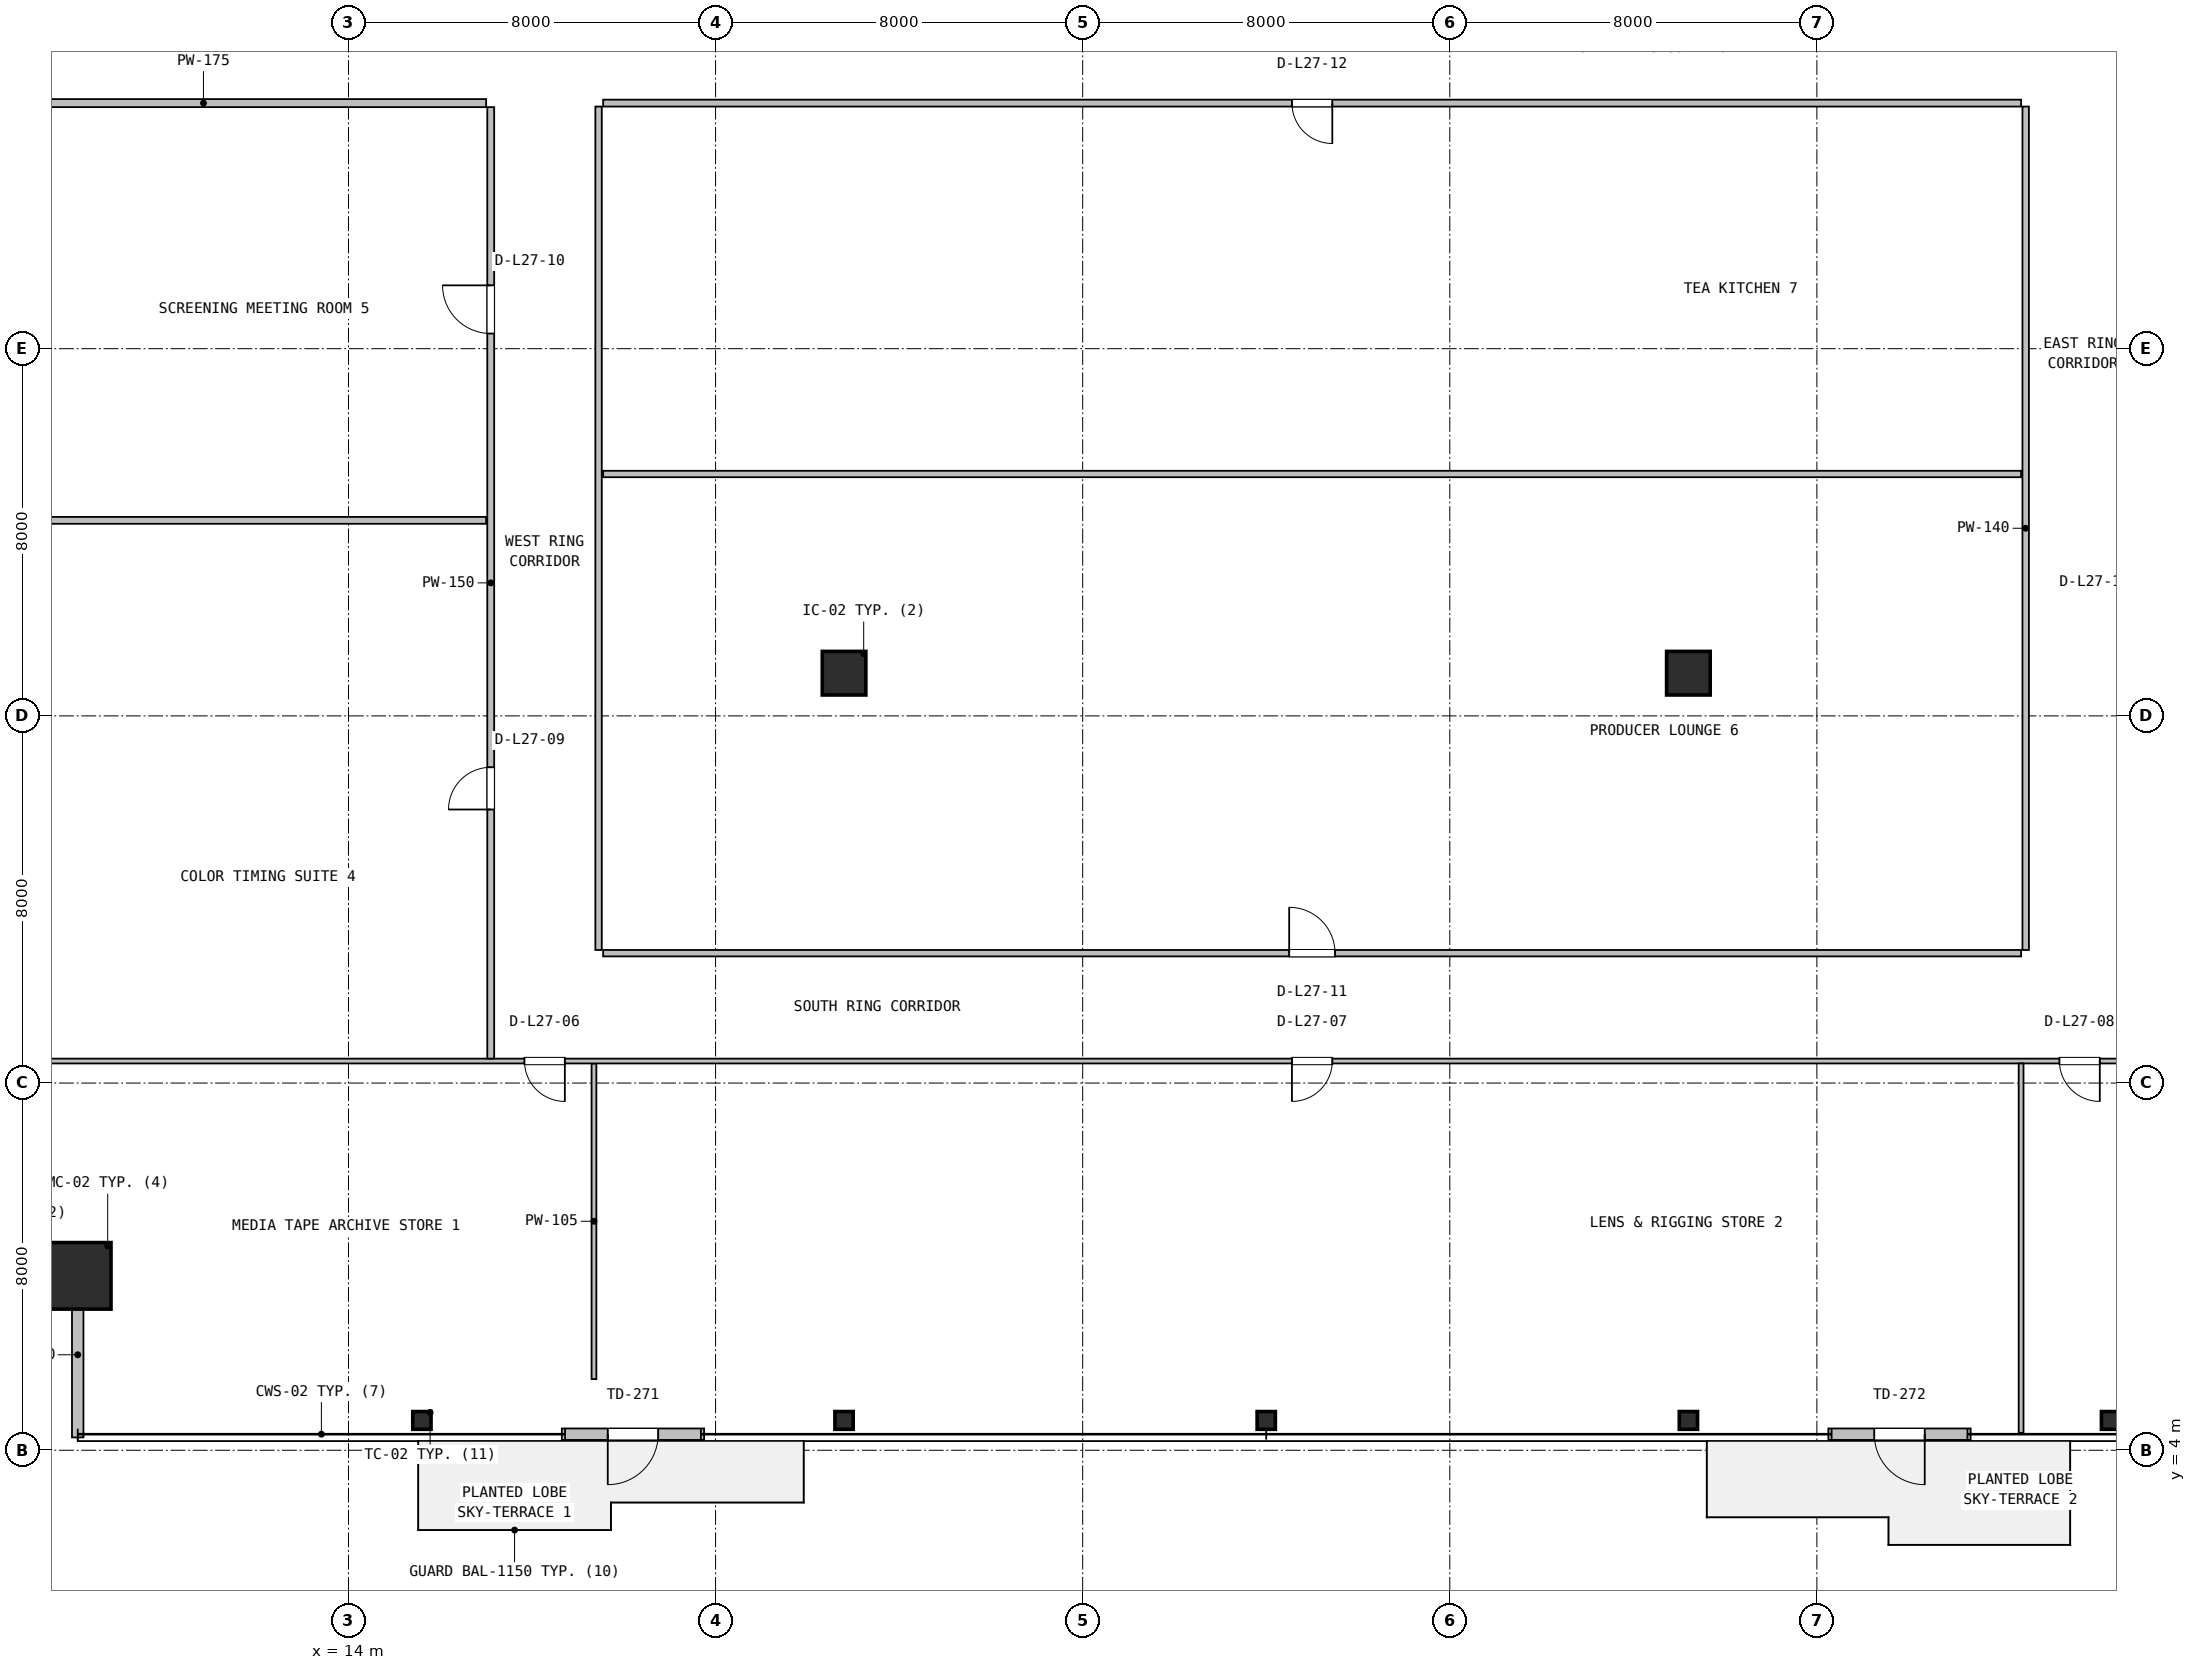
"""IFC4 building model, lengths in metres.
Left out: names, types, materials, properties, quantities, classifications, styles, units other than length and angle.
Written with IfcOpenShell. Run it as: python <this file> out.ifc"""

import sys

from ifc_helpers import new_model, si_unit, direction, frame, frame_2d, origin, origin_2d, place, context, subcontext, project, spatial, rectangle, hollow_rectangle, i_section, extrude, source, transform, mapped, element, fill, save


model = new_model("IFC4")
c1 = context("Model", 3, precision=1e-05, world=origin(), true_north=direction((0.0, 1.0)))
c2 = subcontext(c1, "Body", "Model", "MODEL_VIEW")
j1 = project(units=[si_unit("LENGTHUNIT", "METRE"), si_unit("PLANEANGLEUNIT", "RADIAN")], contexts=[c1])
p1 = place(None, origin())
s1 = spatial("IfcSite", under=j1, at=p1, CompositionType="ELEMENT")
p2 = place(p1, origin())
s2 = spatial("IfcBuilding", under=s1, at=p2, CompositionType="ELEMENT")
p3 = place(p2, frame((0.0, 0.0, 114.4)))
s3 = spatial("IfcBuildingStorey", under=s2, at=p3, CompositionType="ELEMENT", Elevation=114.4)
m1 = source(origin(), c2, "Body", "SweptSolid", [
    extrude(hollow_rectangle(XDim=1.45, YDim=1.45, WallThickness=0.055, at=origin_2d()), origin(), (0.0, 0.0, 1.0), 3.8),
])
p4 = place(p3, frame((8.1, 7.8, 0.0), z_axis=(0.0, 0.0, 1.0), x_axis=(1.0, 0.0, 0.0)))
e1 = element("IfcColumn", 1, at=p4, inside=s3, PredefinedType="COLUMN", context=c2, shape_type="MappedRepresentation", body=[
    mapped(m1, transform((0.0, 0.0, 0.0), x_axis=(1.0, 0.0, 0.0), y_axis=(0.0, 1.0, 0.0), z_axis=(0.0, 0.0, 1.0), scale=1.0)),
])
m2 = source(origin(), c2, "Body", "SweptSolid", [
    extrude(i_section(OverallWidth=0.398, OverallDepth=0.387, WebThickness=0.021, FlangeThickness=0.033, FilletRadius=0.018, at=origin_2d()), origin(), (0.0, 0.0, 1.0), 3.8),
])
for number, where, z_axis, x_axis in (
    (2, (15.6, 4.65, 0.0), (0.0, 0.0, 1.0), (1.0, 0.0, 0.0)),
    (3, (24.8, 4.65, 0.0), (0.0, 0.0, 1.0), (1.0, 0.0, 0.0)),
    (4, (34.0, 4.65, 0.0), (0.0, 0.0, 1.0), (1.0, 0.0, 0.0)),
    (5, (43.2, 4.65, 0.0), (0.0, 0.0, 1.0), (1.0, 0.0, 0.0)),
    (6, (52.4, 4.65, 0.0), (0.0, 0.0, 1.0), (1.0, 0.0, 0.0)),
):
    element("IfcColumn", number, at=place(p3, frame(where, z_axis=z_axis, x_axis=x_axis)), inside=s3, PredefinedType="COLUMN", context=c2, shape_type="MappedRepresentation", body=[
        mapped(m2, transform((0.0, 0.0, 0.0), x_axis=(1.0, 0.0, 0.0), y_axis=(0.0, 1.0, 0.0), z_axis=(0.0, 0.0, 1.0), scale=1.0)),
    ])
m3 = source(origin(), c2, "Body", "SweptSolid", [
    extrude(rectangle(XDim=0.95, YDim=0.95, at=origin_2d()), origin(), (0.0, 0.0, 1.0), 3.8),
])
for number, where, z_axis, x_axis in (
    (7, (24.8, 20.93, 0.0), (0.0, 0.0, 1.0), (1.0, 0.0, 0.0)),
    (8, (43.2, 20.93, 0.0), (0.0, 0.0, 1.0), (1.0, 0.0, 0.0)),
):
    element("IfcColumn", number, at=place(p3, frame(where, z_axis=z_axis, x_axis=x_axis)), inside=s3, PredefinedType="COLUMN", context=c2, shape_type="MappedRepresentation", body=[
        mapped(m3, transform((0.0, 0.0, 0.0), x_axis=(1.0, 0.0, 0.0), y_axis=(0.0, 1.0, 0.0), z_axis=(0.0, 0.0, 1.0), scale=1.0)),
    ])
p5 = place(p3, frame((18.65, 4.35, 0.0), z_axis=(0.0, 0.0, 1.0), x_axis=(1.0, 0.0, 0.0)))
e9 = element("IfcWall", 9, at=p5, inside=s3, PredefinedType="SOLIDWALL", context=c2, shape_type="SweptSolid", body=[
    extrude(rectangle(XDim=3.1, YDim=0.25, at=frame_2d((1.55, 0.0))), origin(), (0.0, 0.0, 1.0), 3.53),
])
p6 = place(p5, frame((1.0, 0.0, 0.0)))
e10 = element("IfcOpeningElement", 10, at=p6, cuts=e9, PredefinedType="OPENING", context=c2, shape_type="SweptSolid", body=[
    extrude(rectangle(XDim=1.1, YDim=2.15, at=frame_2d((0.55, 1.075))), frame((0.0, 0.135, 0.0), z_axis=(0.0, -1.0, 0.0), x_axis=(1.0, 0.0, 0.0)), (0.0, 0.0, 1.0), 0.27),
])
p7 = place(p3, frame((46.25, 4.35, 0.0), z_axis=(0.0, 0.0, 1.0), x_axis=(1.0, 0.0, 0.0)))
e11 = element("IfcWall", 11, at=p7, inside=s3, PredefinedType="SOLIDWALL", context=c2, shape_type="SweptSolid", body=[
    extrude(rectangle(XDim=3.1, YDim=0.25, at=frame_2d((1.55, 0.0))), origin(), (0.0, 0.0, 1.0), 3.53),
])
p8 = place(p7, frame((1.0, 0.0, 0.0)))
e12 = element("IfcOpeningElement", 12, at=p8, cuts=e11, PredefinedType="OPENING", context=c2, shape_type="SweptSolid", body=[
    extrude(rectangle(XDim=1.1, YDim=2.15, at=frame_2d((0.55, 1.075))), frame((0.0, 0.135, 0.0), z_axis=(0.0, -1.0, 0.0), x_axis=(1.0, 0.0, 0.0)), (0.0, 0.0, 1.0), 0.27),
])
p9 = place(p3, frame((8.1, 4.28, 0.0), z_axis=(0.0, 0.0, 1.0), x_axis=(0.0, 1.0, 0.0)))
e13 = element("IfcWall", 13, at=p9, inside=s3, PredefinedType="SOLIDWALL", context=c2, shape_type="SweptSolid", body=[
    extrude(rectangle(XDim=3.6, YDim=0.25, at=frame_2d((1.8, 0.0))), origin(), (0.0, 0.0, 1.0), 3.108),
])
p10 = place(p3, frame((19.35, 5.55, 0.0), z_axis=(0.0, 0.0, 1.0), x_axis=(0.0, 1.0, 0.0)))
e14 = element("IfcWall", 14, at=p10, inside=s3, PredefinedType="PARTITIONING", context=c2, shape_type="SweptSolid", body=[
    extrude(rectangle(XDim=6.878, YDim=0.105, at=frame_2d((3.439, 0.0))), origin(), (0.0, 0.0, 1.0), 3.222),
])
p11 = place(p3, frame((4.68, 12.48, 0.0), z_axis=(0.0, 0.0, 1.0), x_axis=(1.0, 0.0, 0.0)))
e15 = element("IfcWall", 15, at=p11, inside=s3, PredefinedType="PARTITIONING", context=c2, shape_type="SweptSolid", body=[
    extrude(rectangle(XDim=58.64, YDim=0.105, at=frame_2d((29.32, 0.0))), origin(), (0.0, 0.0, 1.0), 2.83),
])
p12 = place(p11, frame((13.155, 0.0, 0.0)))
e16 = element("IfcOpeningElement", 16, at=p12, cuts=e15, PredefinedType="OPENING", context=c2, shape_type="SweptSolid", body=[
    extrude(rectangle(XDim=0.88, YDim=2.06, at=frame_2d((0.44, 1.03))), frame((0.0, 0.062, 0.0), z_axis=(0.0, -1.0, 0.0), x_axis=(1.0, 0.0, 0.0)), (0.0, 0.0, 1.0), 0.125),
])
p13 = place(p11, frame((29.88, 0.0, 0.0)))
e17 = element("IfcOpeningElement", 17, at=p13, cuts=e15, PredefinedType="OPENING", context=c2, shape_type="SweptSolid", body=[
    extrude(rectangle(XDim=0.88, YDim=2.06, at=frame_2d((0.44, 1.03))), frame((0.0, 0.062, 0.0), z_axis=(0.0, -1.0, 0.0), x_axis=(1.0, 0.0, 0.0)), (0.0, 0.0, 1.0), 0.125),
])
p14 = place(p11, frame((46.605, 0.0, 0.0)))
e18 = element("IfcOpeningElement", 18, at=p14, cuts=e15, PredefinedType="OPENING", context=c2, shape_type="SweptSolid", body=[
    extrude(rectangle(XDim=0.88, YDim=2.06, at=frame_2d((0.44, 1.03))), frame((0.0, 0.062, 0.0), z_axis=(0.0, -1.0, 0.0), x_axis=(1.0, 0.0, 0.0)), (0.0, 0.0, 1.0), 0.125),
])
p15 = place(p3, frame((50.45, 4.38, 0.0), z_axis=(0.0, 0.0, 1.0), x_axis=(0.0, 1.0, 0.0)))
e19 = element("IfcWall", 19, at=p15, inside=s3, PredefinedType="PARTITIONING", context=c2, shape_type="SweptSolid", body=[
    extrude(rectangle(XDim=8.048, YDim=0.105, at=frame_2d((4.024, 0.0))), origin(), (0.0, 0.0, 1.0), 3.108),
])
p16 = place(p3, frame((17.1, 12.533, 0.0), z_axis=(0.0, 0.0, 1.0), x_axis=(0.0, 1.0, 0.0)))
e20 = element("IfcWall", 20, at=p16, inside=s3, PredefinedType="PARTITIONING", context=c2, shape_type="SweptSolid", body=[
    extrude(rectangle(XDim=20.73, YDim=0.15, at=frame_2d((10.365, 0.0))), origin(), (0.0, 0.0, 1.0), 3.222),
])
p17 = place(p16, frame((5.427, 0.0, 0.0)))
e21 = element("IfcOpeningElement", 21, at=p17, cuts=e20, PredefinedType="OPENING", context=c2, shape_type="SweptSolid", body=[
    extrude(rectangle(XDim=0.92, YDim=2.08, at=frame_2d((0.46, 1.04))), frame((0.0, 0.085, 0.0), z_axis=(0.0, -1.0, 0.0), x_axis=(1.0, 0.0, 0.0)), (0.0, 0.0, 1.0), 0.17),
])
p18 = place(p16, frame((15.797, 0.0, 0.0)))
e22 = element("IfcOpeningElement", 22, at=p18, cuts=e20, PredefinedType="OPENING", context=c2, shape_type="SweptSolid", body=[
    extrude(rectangle(XDim=1.05, YDim=2.1, at=frame_2d((0.525, 1.05))), frame((0.0, 0.085, 0.0), z_axis=(0.0, -1.0, 0.0), x_axis=(1.0, 0.0, 0.0)), (0.0, 0.0, 1.0), 0.17),
])
p19 = place(p3, frame((4.68, 24.26, 0.0), z_axis=(0.0, 0.0, 1.0), x_axis=(1.0, 0.0, 0.0)))
e23 = element("IfcWall", 23, at=p19, inside=s3, PredefinedType="PARTITIONING", context=c2, shape_type="SweptSolid", body=[
    extrude(rectangle(XDim=12.32, YDim=0.15, at=frame_2d((6.16, 0.0))), origin(), (0.0, 0.0, 1.0), 3.108),
])
p20 = place(p3, frame((4.68, 33.35, 0.0), z_axis=(0.0, 0.0, 1.0), x_axis=(1.0, 0.0, 0.0)))
e24 = element("IfcWall", 24, at=p20, inside=s3, PredefinedType="PARTITIONING", context=c2, shape_type="SweptSolid", body=[
    extrude(rectangle(XDim=12.32, YDim=0.175, at=frame_2d((6.16, 0.0))), origin(), (0.0, 0.0, 1.0), 3.108),
])
p21 = place(p3, frame((19.55, 14.83, 0.0), z_axis=(0.0, 0.0, 1.0), x_axis=(1.0, 0.0, 0.0)))
e25 = element("IfcWall", 25, at=p21, inside=s3, PredefinedType="PARTITIONING", context=c2, shape_type="SweptSolid", body=[
    extrude(rectangle(XDim=30.9, YDim=0.14, at=frame_2d((15.45, 0.0))), origin(), (0.0, 0.0, 1.0), 2.83),
])
p22 = place(p21, frame((14.95, 0.0, 0.0)))
e26 = element("IfcOpeningElement", 26, at=p22, cuts=e25, PredefinedType="OPENING", context=c2, shape_type="SweptSolid", body=[
    extrude(rectangle(XDim=1.0, YDim=2.1, at=frame_2d((0.5, 1.05))), frame((0.0, 0.08, 0.0), z_axis=(0.0, -1.0, 0.0), x_axis=(1.0, 0.0, 0.0)), (0.0, 0.0, 1.0), 0.16),
])
p23 = place(p3, frame((50.55, 14.9, 0.0), z_axis=(0.0, 0.0, 1.0), x_axis=(0.0, 1.0, 0.0)))
e27 = element("IfcWall", 27, at=p23, inside=s3, PredefinedType="PARTITIONING", context=c2, shape_type="SweptSolid", body=[
    extrude(rectangle(XDim=18.375, YDim=0.14, at=frame_2d((9.188, 0.0))), origin(), (0.0, 0.0, 1.0), 3.222),
])
p24 = place(p3, frame((19.55, 25.27, 0.0), z_axis=(0.0, 0.0, 1.0), x_axis=(1.0, 0.0, 0.0)))
e28 = element("IfcWall", 28, at=p24, inside=s3, PredefinedType="PARTITIONING", context=c2, shape_type="SweptSolid", body=[
    extrude(rectangle(XDim=30.9, YDim=0.14, at=frame_2d((15.45, 0.0))), origin(), (0.0, 0.0, 1.0), 2.83),
])
p25 = place(p3, frame((19.45, 14.9, 0.0), z_axis=(0.0, 0.0, 1.0), x_axis=(0.0, 1.0, 0.0)))
e29 = element("IfcWall", 29, at=p25, inside=s3, PredefinedType="PARTITIONING", context=c2, shape_type="SweptSolid", body=[
    extrude(rectangle(XDim=18.375, YDim=0.14, at=frame_2d((9.188, 0.0))), origin(), (0.0, 0.0, 1.0), 3.222),
])
p26 = place(p3, frame((19.55, 33.35, 0.0), z_axis=(0.0, 0.0, 1.0), x_axis=(1.0, 0.0, 0.0)))
e30 = element("IfcWall", 30, at=p26, inside=s3, PredefinedType="PARTITIONING", context=c2, shape_type="SweptSolid", body=[
    extrude(rectangle(XDim=30.9, YDim=0.15, at=frame_2d((15.45, 0.0))), origin(), (0.0, 0.0, 1.0), 2.83),
])
p27 = place(p26, frame((15.01, 0.0, 0.0)))
e31 = element("IfcOpeningElement", 31, at=p27, cuts=e30, PredefinedType="OPENING", context=c2, shape_type="SweptSolid", body=[
    extrude(rectangle(XDim=0.88, YDim=2.06, at=frame_2d((0.44, 1.03))), frame((0.0, 0.085, 0.0), z_axis=(0.0, -1.0, 0.0), x_axis=(1.0, 0.0, 0.0)), (0.0, 0.0, 1.0), 0.17),
])
m4 = source(origin(), c2, "Body", "SweptSolid", [
    extrude(rectangle(XDim=1.1, YDim=2.15, at=frame_2d((0.55, 1.075))), frame((0.0, 0.025, 0.0), z_axis=(0.0, -1.0, 0.0), x_axis=(1.0, 0.0, 0.0)), (0.0, 0.0, 1.0), 0.05),
])
p28 = place(p6, frame((1.1, 0.0, 0.0), z_axis=(0.0, 0.0, 1.0), x_axis=(-1.0, 0.0, 0.0)))
e32 = element("IfcDoor", 32, at=p28, inside=s3, OperationType="SINGLE_SWING_LEFT", PredefinedType="DOOR", context=c2, shape_type="MappedRepresentation", body=[
    mapped(m4, transform((0.0, 0.0, 0.0), x_axis=(1.0, 0.0, 0.0), y_axis=(0.0, 1.0, 0.0), z_axis=(0.0, 0.0, 1.0), scale=1.0)),
])
fill(e10, e32)
p29 = place(p8, frame((1.1, 0.0, 0.0), z_axis=(0.0, 0.0, 1.0), x_axis=(-1.0, 0.0, 0.0)))
e33 = element("IfcDoor", 33, at=p29, inside=s3, OperationType="SINGLE_SWING_RIGHT", PredefinedType="DOOR", context=c2, shape_type="MappedRepresentation", body=[
    mapped(m4, transform((0.0, 0.0, 0.0), x_axis=(1.0, 0.0, 0.0), y_axis=(0.0, 1.0, 0.0), z_axis=(0.0, 0.0, 1.0), scale=1.0)),
])
fill(e12, e33)
m5 = source(origin(), c2, "Body", "SweptSolid", [
    extrude(rectangle(XDim=0.88, YDim=2.06, at=frame_2d((0.44, 1.03))), frame((0.0, 0.025, 0.0), z_axis=(0.0, -1.0, 0.0), x_axis=(1.0, 0.0, 0.0)), (0.0, 0.0, 1.0), 0.05),
])
p30 = place(p12, frame((0.88, 0.0, 0.0), z_axis=(0.0, 0.0, 1.0), x_axis=(-1.0, 0.0, 0.0)))
e34 = element("IfcDoor", 34, at=p30, inside=s3, OperationType="SINGLE_SWING_RIGHT", PredefinedType="DOOR", context=c2, shape_type="MappedRepresentation", body=[
    mapped(m5, transform((0.0, 0.0, 0.0), x_axis=(1.0, 0.0, 0.0), y_axis=(0.0, 1.0, 0.0), z_axis=(0.0, 0.0, 1.0), scale=1.0)),
])
fill(e16, e34)
p31 = place(p13, frame((0.88, 0.0, 0.0), z_axis=(0.0, 0.0, 1.0), x_axis=(-1.0, 0.0, 0.0)))
e35 = element("IfcDoor", 35, at=p31, inside=s3, OperationType="SINGLE_SWING_LEFT", PredefinedType="DOOR", context=c2, shape_type="MappedRepresentation", body=[
    mapped(m5, transform((0.0, 0.0, 0.0), x_axis=(1.0, 0.0, 0.0), y_axis=(0.0, 1.0, 0.0), z_axis=(0.0, 0.0, 1.0), scale=1.0)),
])
fill(e17, e35)
p32 = place(p14, frame((0.88, 0.0, 0.0), z_axis=(0.0, 0.0, 1.0), x_axis=(-1.0, 0.0, 0.0)))
e36 = element("IfcDoor", 36, at=p32, inside=s3, OperationType="SINGLE_SWING_RIGHT", PredefinedType="DOOR", context=c2, shape_type="MappedRepresentation", body=[
    mapped(m5, transform((0.0, 0.0, 0.0), x_axis=(1.0, 0.0, 0.0), y_axis=(0.0, 1.0, 0.0), z_axis=(0.0, 0.0, 1.0), scale=1.0)),
])
fill(e18, e36)
m6 = source(origin(), c2, "Body", "SweptSolid", [
    extrude(rectangle(XDim=0.92, YDim=2.08, at=frame_2d((0.46, 1.04))), frame((0.0, 0.025, 0.0), z_axis=(0.0, -1.0, 0.0), x_axis=(1.0, 0.0, 0.0)), (0.0, 0.0, 1.0), 0.05),
])
p33 = place(p17, origin())
e37 = element("IfcDoor", 37, at=p33, inside=s3, OperationType="SINGLE_SWING_LEFT", PredefinedType="DOOR", context=c2, shape_type="MappedRepresentation", body=[
    mapped(m6, transform((0.0, 0.0, 0.0), x_axis=(1.0, 0.0, 0.0), y_axis=(0.0, 1.0, 0.0), z_axis=(0.0, 0.0, 1.0), scale=1.0)),
])
fill(e21, e37)
m7 = source(origin(), c2, "Body", "SweptSolid", [
    extrude(rectangle(XDim=1.05, YDim=2.1, at=frame_2d((0.525, 1.05))), frame((0.0, 0.025, 0.0), z_axis=(0.0, -1.0, 0.0), x_axis=(1.0, 0.0, 0.0)), (0.0, 0.0, 1.0), 0.05),
])
p34 = place(p18, origin())
e38 = element("IfcDoor", 38, at=p34, inside=s3, OperationType="SINGLE_SWING_RIGHT", PredefinedType="DOOR", context=c2, shape_type="MappedRepresentation", body=[
    mapped(m7, transform((0.0, 0.0, 0.0), x_axis=(1.0, 0.0, 0.0), y_axis=(0.0, 1.0, 0.0), z_axis=(0.0, 0.0, 1.0), scale=1.0)),
])
fill(e22, e38)
m8 = source(origin(), c2, "Body", "SweptSolid", [
    extrude(rectangle(XDim=1.0, YDim=2.1, at=frame_2d((0.5, 1.05))), frame((0.0, 0.025, 0.0), z_axis=(0.0, -1.0, 0.0), x_axis=(1.0, 0.0, 0.0)), (0.0, 0.0, 1.0), 0.05),
])
p35 = place(p22, origin())
e39 = element("IfcDoor", 39, at=p35, inside=s3, OperationType="SINGLE_SWING_LEFT", PredefinedType="DOOR", context=c2, shape_type="MappedRepresentation", body=[
    mapped(m8, transform((0.0, 0.0, 0.0), x_axis=(1.0, 0.0, 0.0), y_axis=(0.0, 1.0, 0.0), z_axis=(0.0, 0.0, 1.0), scale=1.0)),
])
fill(e26, e39)
p36 = place(p27, frame((0.88, 0.0, 0.0), z_axis=(0.0, 0.0, 1.0), x_axis=(-1.0, 0.0, 0.0)))
e40 = element("IfcDoor", 40, at=p36, inside=s3, OperationType="SINGLE_SWING_RIGHT", PredefinedType="DOOR", context=c2, shape_type="MappedRepresentation", body=[
    mapped(m5, transform((0.0, 0.0, 0.0), x_axis=(1.0, 0.0, 0.0), y_axis=(0.0, 1.0, 0.0), z_axis=(0.0, 0.0, 1.0), scale=1.0)),
])
fill(e31, e40)
save(model, sys.argv[1])
